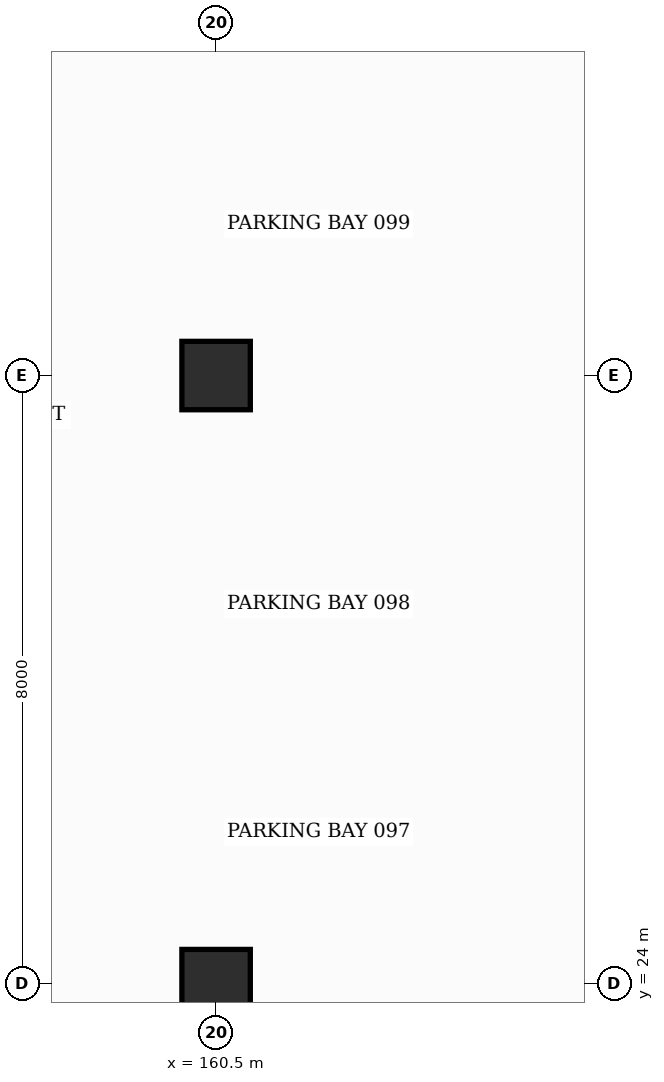
"""IFC4 building model, lengths in metres.
Left out: names, types, materials, properties, quantities, classifications, styles, units other than length and angle.
Written with IfcOpenShell. Run it as: python <this file> out.ifc"""

import sys

from ifc_helpers import new_model, si_unit, direction, frame, origin, origin_2d, place, context, subcontext, project, spatial, hollow_rectangle, extrude, element, save


model = new_model("IFC4")
c1 = context("Model", 3, precision=1e-05, world=origin(), true_north=direction((0.0, 1.0)))
c2 = subcontext(c1, "Body", "Model", "MODEL_VIEW")
j1 = project(units=[si_unit("LENGTHUNIT", "METRE"), si_unit("PLANEANGLEUNIT", "RADIAN")], contexts=[c1])
p1 = place(None, origin())
s1 = spatial("IfcSite", under=j1, at=p1, CompositionType="ELEMENT")
p2 = place(p1, origin())
s2 = spatial("IfcBuilding", under=s1, at=p2, CompositionType="ELEMENT")
p3 = place(p2, frame((0.0, 0.0, -5.4)))
s3 = spatial("IfcBuildingStorey", under=s2, at=p3, CompositionType="ELEMENT", Elevation=-5.4)
for number, where, z_axis, x_axis in (
    (1, (160.5, 24.0, 0.0), (0.0, 0.0, 1.0), (1.0, 0.0, 0.0)),
    (2, (160.5, 32.0, 0.0), (0.0, 0.0, 1.0), (1.0, 0.0, 0.0)),
):
    element("IfcColumn", number, at=place(p3, frame(where, z_axis=z_axis, x_axis=x_axis)), inside=s3, PredefinedType="COLUMN", context=c2, shape_type="SweptSolid", body=[
        extrude(hollow_rectangle(XDim=0.9, YDim=0.9, WallThickness=0.032, InnerFilletRadius=0.032, OuterFilletRadius=0.064, at=origin_2d()), origin(), (0.0, 0.0, 1.0), 5.4),
    ])
save(model, sys.argv[1])
